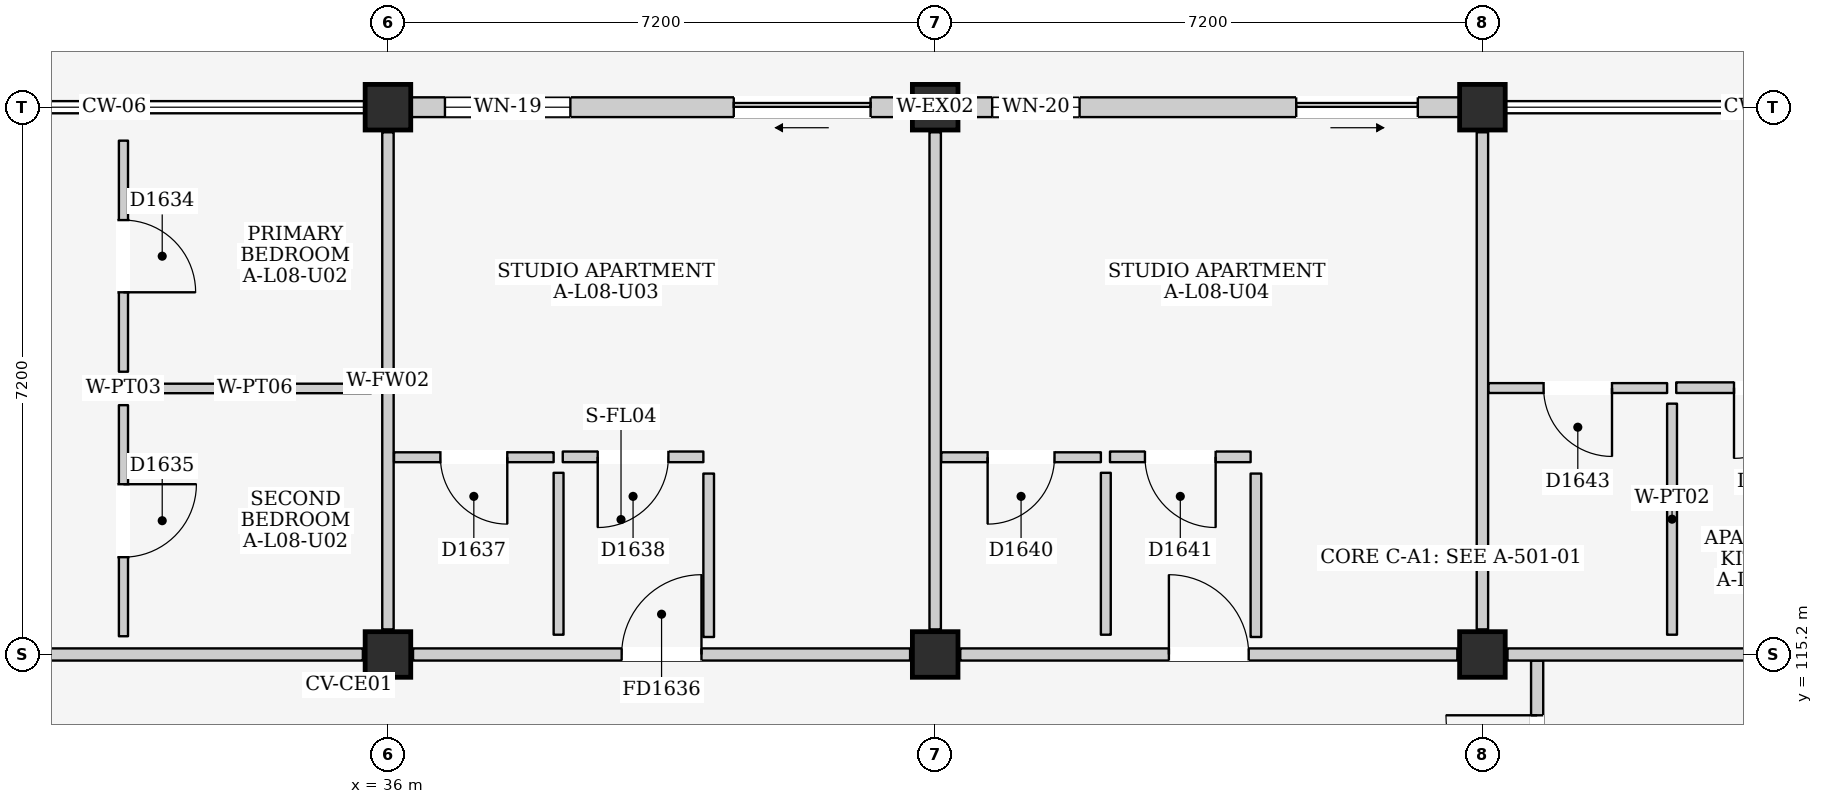
"""IFC4 building model, lengths in metres.
Left out: names, types, materials, properties, quantities, classifications, styles, units other than length and angle.
Written with IfcOpenShell. Run it as: python <this file> out.ifc"""

import sys

from ifc_helpers import new_model, si_unit, direction, frame, frame_2d, origin, origin_2d, place, context, subcontext, project, spatial, rectangle, extrude, element, fill, save


model = new_model("IFC4")
c1 = context("Model", 3, precision=1e-05, world=origin(), true_north=direction((0.0, 1.0)))
c2 = subcontext(c1, "Body", "Model", "MODEL_VIEW")
j1 = project(units=[si_unit("LENGTHUNIT", "METRE"), si_unit("PLANEANGLEUNIT", "RADIAN")], contexts=[c1])
p1 = place(None, origin())
s1 = spatial("IfcSite", under=j1, at=p1, CompositionType="ELEMENT")
p2 = place(p1, origin())
s2 = spatial("IfcBuilding", under=s1, at=p2, CompositionType="ELEMENT")
p3 = place(p2, frame((0.0, 0.0, 28.3)))
s3 = spatial("IfcBuildingStorey", under=s2, at=p3, CompositionType="ELEMENT", Elevation=28.3)
for number, where, z_axis, x_axis in (
    (1, (36.0, 115.2, 0.0), (0.0, 0.0, 1.0), (1.0, 0.0, 0.0)),
    (2, (36.0, 122.4, 0.0), (0.0, 0.0, 1.0), (1.0, 0.0, 0.0)),
    (3, (43.2, 115.2, 0.0), (0.0, 0.0, 1.0), (1.0, 0.0, 0.0)),
    (4, (43.2, 122.4, 0.0), (0.0, 0.0, 1.0), (1.0, 0.0, 0.0)),
    (5, (50.4, 115.2, 0.0), (0.0, 0.0, 1.0), (1.0, 0.0, 0.0)),
    (6, (50.4, 122.4, 0.0), (0.0, 0.0, 1.0), (1.0, 0.0, 0.0)),
):
    element("IfcColumn", number, at=place(p3, frame(where, z_axis=z_axis, x_axis=x_axis)), inside=s3, PredefinedType="COLUMN", context=c2, shape_type="SweptSolid", body=[
        extrude(rectangle(XDim=0.6, YDim=0.6, at=origin_2d()), origin(), (0.0, 0.0, 1.0), 3.2),
    ])
p4 = place(p3, frame((36.3, 122.4, 0.0), z_axis=(0.0, 0.0, 1.0), x_axis=(1.0, 0.0, 0.0)))
e7 = element("IfcWall", 7, at=p4, inside=s3, PredefinedType="ELEMENTEDWALL", context=c2, shape_type="SweptSolid", body=[
    extrude(rectangle(XDim=6.6, YDim=0.26, at=frame_2d((3.3, 0.0))), origin(), (0.0, 0.0, 1.0), 2.485),
])
p5 = place(p4, frame((4.25, 0.0, 0.0)))
e8 = element("IfcOpeningElement", 8, at=p5, cuts=e7, PredefinedType="OPENING", context=c2, shape_type="SweptSolid", body=[
    extrude(rectangle(XDim=1.8, YDim=2.12, at=frame_2d((0.9, 1.06))), frame((0.0, 0.145, 0.0), z_axis=(0.0, -1.0, 0.0), x_axis=(1.0, 0.0, 0.0)), (0.0, 0.0, 1.0), 0.29),
])
p6 = place(p4, frame((0.45, 0.0, 0.9)))
e9 = element("IfcOpeningElement", 9, at=p6, cuts=e7, PredefinedType="OPENING", context=c2, shape_type="SweptSolid", body=[
    extrude(rectangle(XDim=1.65, YDim=1.35, at=frame_2d((0.825, 0.675))), frame((0.0, 0.145, 0.0), z_axis=(0.0, -1.0, 0.0), x_axis=(1.0, 0.0, 0.0)), (0.0, 0.0, 1.0), 0.29),
])
p7 = place(p3, frame((43.5, 122.4, 0.0), z_axis=(0.0, 0.0, 1.0), x_axis=(1.0, 0.0, 0.0)))
e10 = element("IfcWall", 10, at=p7, inside=s3, PredefinedType="ELEMENTEDWALL", context=c2, shape_type="SweptSolid", body=[
    extrude(rectangle(XDim=6.6, YDim=0.26, at=frame_2d((3.3, 0.0))), origin(), (0.0, 0.0, 1.0), 2.485),
])
p8 = place(p7, frame((4.45, 0.0, 0.0)))
e11 = element("IfcOpeningElement", 11, at=p8, cuts=e10, PredefinedType="OPENING", context=c2, shape_type="SweptSolid", body=[
    extrude(rectangle(XDim=1.6, YDim=2.12, at=frame_2d((0.8, 1.06))), frame((0.0, 0.145, 0.0), z_axis=(0.0, -1.0, 0.0), x_axis=(1.0, 0.0, 0.0)), (0.0, 0.0, 1.0), 0.29),
])
p9 = place(p7, frame((0.45, 0.0, 0.9)))
e12 = element("IfcOpeningElement", 12, at=p9, cuts=e10, PredefinedType="OPENING", context=c2, shape_type="SweptSolid", body=[
    extrude(rectangle(XDim=1.15, YDim=1.15, at=frame_2d((0.575, 0.575))), frame((0.0, 0.145, 0.0), z_axis=(0.0, -1.0, 0.0), x_axis=(1.0, 0.0, 0.0)), (0.0, 0.0, 1.0), 0.29),
])
p10 = place(p3, frame((51.12, 111.1, 0.0), z_axis=(0.0, 0.0, 1.0), x_axis=(0.0, 1.0, 0.0)))
e13 = element("IfcWall", 13, at=p10, inside=s3, PredefinedType="PARTITIONING", context=c2, shape_type="SweptSolid", body=[
    extrude(rectangle(XDim=4.02, YDim=0.16, at=frame_2d((2.01, 0.0))), origin(), (0.0, 0.0, 1.0), 2.95),
])
p11 = place(p10, frame((2.1, 0.0, 0.0)))
e14 = element("IfcOpeningElement", 14, at=p11, cuts=e13, PredefinedType="OPENING", context=c2, shape_type="SweptSolid", body=[
    extrude(rectangle(XDim=1.2, YDim=2.2, at=frame_2d((0.6, 1.1))), frame((0.0, 0.095, 0.0), z_axis=(0.0, -1.0, 0.0), x_axis=(1.0, 0.0, 0.0)), (0.0, 0.0, 1.0), 0.19),
])
p12 = place(p3, frame((29.13, 115.2, 0.0), z_axis=(0.0, 0.0, 1.0), x_axis=(1.0, 0.0, 0.0)))
e15 = element("IfcWall", 15, at=p12, inside=s3, PredefinedType="PARTITIONING", context=c2, shape_type="SweptSolid", body=[
    extrude(rectangle(XDim=6.54, YDim=0.16, at=frame_2d((3.27, 0.0))), origin(), (0.0, 0.0, 1.0), 2.285),
])
p13 = place(p3, frame((36.0, 115.53, 0.0), z_axis=(0.0, 0.0, 1.0), x_axis=(0.0, 1.0, 0.0)))
e16 = element("IfcWall", 16, at=p13, inside=s3, PredefinedType="PARTITIONING", context=c2, shape_type="SweptSolid", body=[
    extrude(rectangle(XDim=6.54, YDim=0.15, at=frame_2d((3.27, 0.0))), origin(), (0.0, 0.0, 1.0), 2.435),
])
p14 = place(p3, frame((32.52, 118.92, 0.0), z_axis=(0.0, 0.0, 1.0), x_axis=(0.0, 1.0, 0.0)))
e17 = element("IfcWall", 17, at=p14, inside=s3, PredefinedType="PARTITIONING", context=c2, shape_type="SweptSolid", body=[
    extrude(rectangle(XDim=3.04, YDim=0.12, at=frame_2d((1.52, 0.0))), origin(), (0.0, 0.0, 1.0), 2.95),
])
p15 = place(p14, frame((1.045, 0.0, 0.0)))
e18 = element("IfcOpeningElement", 18, at=p15, cuts=e17, PredefinedType="OPENING", context=c2, shape_type="SweptSolid", body=[
    extrude(rectangle(XDim=0.95, YDim=2.15, at=frame_2d((0.475, 1.075))), frame((0.0, 0.075, 0.0), z_axis=(0.0, -1.0, 0.0), x_axis=(1.0, 0.0, 0.0)), (0.0, 0.0, 1.0), 0.15),
])
p16 = place(p3, frame((32.72, 118.7, 0.0), z_axis=(0.0, 0.0, 1.0), x_axis=(1.0, 0.0, 0.0)))
e19 = element("IfcWall", 19, at=p16, inside=s3, PredefinedType="PARTITIONING", context=c2, shape_type="SweptSolid", body=[
    extrude(rectangle(XDim=3.06, YDim=0.125, at=frame_2d((1.53, 0.0))), origin(), (0.0, 0.0, 1.0), 2.95),
])
p17 = place(p3, frame((32.52, 115.44, 0.0), z_axis=(0.0, 0.0, 1.0), x_axis=(0.0, 1.0, 0.0)))
e20 = element("IfcWall", 20, at=p17, inside=s3, PredefinedType="PARTITIONING", context=c2, shape_type="SweptSolid", body=[
    extrude(rectangle(XDim=3.04, YDim=0.12, at=frame_2d((1.52, 0.0))), origin(), (0.0, 0.0, 1.0), 2.95),
])
p18 = place(p17, frame((1.04, 0.0, 0.0)))
e21 = element("IfcOpeningElement", 21, at=p18, cuts=e20, PredefinedType="OPENING", context=c2, shape_type="SweptSolid", body=[
    extrude(rectangle(XDim=0.96, YDim=2.15, at=frame_2d((0.48, 1.075))), frame((0.0, 0.075, 0.0), z_axis=(0.0, -1.0, 0.0), x_axis=(1.0, 0.0, 0.0)), (0.0, 0.0, 1.0), 0.15),
])
p19 = place(p3, frame((36.33, 115.2, 0.0), z_axis=(0.0, 0.0, 1.0), x_axis=(1.0, 0.0, 0.0)))
e22 = element("IfcWall", 22, at=p19, inside=s3, PredefinedType="PARTITIONING", context=c2, shape_type="SweptSolid", body=[
    extrude(rectangle(XDim=6.54, YDim=0.16, at=frame_2d((3.27, 0.0))), origin(), (0.0, 0.0, 1.0), 2.285),
])
p20 = place(p19, frame((2.745, 0.0, 0.0)))
e23 = element("IfcOpeningElement", 23, at=p20, cuts=e22, PredefinedType="OPENING", context=c2, shape_type="SweptSolid", body=[
    extrude(rectangle(XDim=1.05, YDim=2.15, at=frame_2d((0.525, 1.075))), frame((0.0, 0.095, 0.0), z_axis=(0.0, -1.0, 0.0), x_axis=(1.0, 0.0, 0.0)), (0.0, 0.0, 1.0), 0.19),
])
p21 = place(p3, frame((43.2, 115.53, 0.0), z_axis=(0.0, 0.0, 1.0), x_axis=(0.0, 1.0, 0.0)))
e24 = element("IfcWall", 24, at=p21, inside=s3, PredefinedType="PARTITIONING", context=c2, shape_type="SweptSolid", body=[
    extrude(rectangle(XDim=6.54, YDim=0.15, at=frame_2d((3.27, 0.0))), origin(), (0.0, 0.0, 1.0), 2.435),
])
p22 = place(p3, frame((36.08, 117.795, 0.0), z_axis=(0.0, 0.0, 1.0), x_axis=(1.0, 0.0, 0.0)))
e25 = element("IfcWall", 25, at=p22, inside=s3, PredefinedType="PARTITIONING", context=c2, shape_type="SweptSolid", body=[
    extrude(rectangle(XDim=2.1, YDim=0.13, at=frame_2d((1.05, 0.0))), origin(), (0.0, 0.0, 1.0), 2.95),
])
p23 = place(p22, frame((0.61, 0.0, 0.0)))
e26 = element("IfcOpeningElement", 26, at=p23, cuts=e25, PredefinedType="OPENING", context=c2, shape_type="SweptSolid", body=[
    extrude(rectangle(XDim=0.88, YDim=2.1, at=frame_2d((0.44, 1.05))), frame((0.0, 0.08, 0.0), z_axis=(0.0, -1.0, 0.0), x_axis=(1.0, 0.0, 0.0)), (0.0, 0.0, 1.0), 0.16),
])
p24 = place(p3, frame((38.245, 115.46, 0.0), z_axis=(0.0, 0.0, 1.0), x_axis=(0.0, 1.0, 0.0)))
e27 = element("IfcWall", 27, at=p24, inside=s3, PredefinedType="PARTITIONING", context=c2, shape_type="SweptSolid", body=[
    extrude(rectangle(XDim=2.13, YDim=0.13, at=frame_2d((1.065, 0.0))), origin(), (0.0, 0.0, 1.0), 2.95),
])
p25 = place(p3, frame((38.3, 117.8, 0.0), z_axis=(0.0, 0.0, 1.0), x_axis=(1.0, 0.0, 0.0)))
e28 = element("IfcWall", 28, at=p25, inside=s3, PredefinedType="PARTITIONING", context=c2, shape_type="SweptSolid", body=[
    extrude(rectangle(XDim=1.85, YDim=0.14, at=frame_2d((0.925, 0.0))), origin(), (0.0, 0.0, 1.0), 2.95),
])
p26 = place(p25, frame((0.46, 0.0, 0.0)))
e29 = element("IfcOpeningElement", 29, at=p26, cuts=e28, PredefinedType="OPENING", context=c2, shape_type="SweptSolid", body=[
    extrude(rectangle(XDim=0.93, YDim=2.14, at=frame_2d((0.465, 1.07))), frame((0.0, 0.085, 0.0), z_axis=(0.0, -1.0, 0.0), x_axis=(1.0, 0.0, 0.0)), (0.0, 0.0, 1.0), 0.17),
])
p27 = place(p3, frame((40.22, 115.43, 0.0), z_axis=(0.0, 0.0, 1.0), x_axis=(0.0, 1.0, 0.0)))
e30 = element("IfcWall", 30, at=p27, inside=s3, PredefinedType="PARTITIONING", context=c2, shape_type="SweptSolid", body=[
    extrude(rectangle(XDim=2.15, YDim=0.14, at=frame_2d((1.075, 0.0))), origin(), (0.0, 0.0, 1.0), 2.95),
])
p28 = place(p3, frame((43.53, 115.2, 0.0), z_axis=(0.0, 0.0, 1.0), x_axis=(1.0, 0.0, 0.0)))
e31 = element("IfcWall", 31, at=p28, inside=s3, PredefinedType="PARTITIONING", context=c2, shape_type="SweptSolid", body=[
    extrude(rectangle(XDim=6.54, YDim=0.16, at=frame_2d((3.27, 0.0))), origin(), (0.0, 0.0, 1.0), 2.285),
])
p29 = place(p28, frame((2.745, 0.0, 0.0)))
e32 = element("IfcOpeningElement", 32, at=p29, cuts=e31, PredefinedType="OPENING", context=c2, shape_type="SweptSolid", body=[
    extrude(rectangle(XDim=1.05, YDim=2.15, at=frame_2d((0.525, 1.075))), frame((0.0, 0.095, 0.0), z_axis=(0.0, -1.0, 0.0), x_axis=(1.0, 0.0, 0.0)), (0.0, 0.0, 1.0), 0.19),
])
p30 = place(p3, frame((50.4, 115.53, 0.0), z_axis=(0.0, 0.0, 1.0), x_axis=(0.0, 1.0, 0.0)))
e33 = element("IfcWall", 33, at=p30, inside=s3, PredefinedType="PARTITIONING", context=c2, shape_type="SweptSolid", body=[
    extrude(rectangle(XDim=6.54, YDim=0.15, at=frame_2d((3.27, 0.0))), origin(), (0.0, 0.0, 1.0), 2.435),
])
p31 = place(p3, frame((43.28, 117.795, 0.0), z_axis=(0.0, 0.0, 1.0), x_axis=(1.0, 0.0, 0.0)))
e34 = element("IfcWall", 34, at=p31, inside=s3, PredefinedType="PARTITIONING", context=c2, shape_type="SweptSolid", body=[
    extrude(rectangle(XDim=2.1, YDim=0.13, at=frame_2d((1.05, 0.0))), origin(), (0.0, 0.0, 1.0), 2.95),
])
p32 = place(p31, frame((0.61, 0.0, 0.0)))
e35 = element("IfcOpeningElement", 35, at=p32, cuts=e34, PredefinedType="OPENING", context=c2, shape_type="SweptSolid", body=[
    extrude(rectangle(XDim=0.88, YDim=2.1, at=frame_2d((0.44, 1.05))), frame((0.0, 0.08, 0.0), z_axis=(0.0, -1.0, 0.0), x_axis=(1.0, 0.0, 0.0)), (0.0, 0.0, 1.0), 0.16),
])
p33 = place(p3, frame((45.445, 115.46, 0.0), z_axis=(0.0, 0.0, 1.0), x_axis=(0.0, 1.0, 0.0)))
e36 = element("IfcWall", 36, at=p33, inside=s3, PredefinedType="PARTITIONING", context=c2, shape_type="SweptSolid", body=[
    extrude(rectangle(XDim=2.13, YDim=0.13, at=frame_2d((1.065, 0.0))), origin(), (0.0, 0.0, 1.0), 2.95),
])
p34 = place(p3, frame((45.5, 117.8, 0.0), z_axis=(0.0, 0.0, 1.0), x_axis=(1.0, 0.0, 0.0)))
e37 = element("IfcWall", 37, at=p34, inside=s3, PredefinedType="PARTITIONING", context=c2, shape_type="SweptSolid", body=[
    extrude(rectangle(XDim=1.85, YDim=0.14, at=frame_2d((0.925, 0.0))), origin(), (0.0, 0.0, 1.0), 2.95),
])
p35 = place(p34, frame((0.46, 0.0, 0.0)))
e38 = element("IfcOpeningElement", 38, at=p35, cuts=e37, PredefinedType="OPENING", context=c2, shape_type="SweptSolid", body=[
    extrude(rectangle(XDim=0.93, YDim=2.14, at=frame_2d((0.465, 1.07))), frame((0.0, 0.085, 0.0), z_axis=(0.0, -1.0, 0.0), x_axis=(1.0, 0.0, 0.0)), (0.0, 0.0, 1.0), 0.17),
])
p36 = place(p3, frame((47.42, 115.43, 0.0), z_axis=(0.0, 0.0, 1.0), x_axis=(0.0, 1.0, 0.0)))
e39 = element("IfcWall", 39, at=p36, inside=s3, PredefinedType="PARTITIONING", context=c2, shape_type="SweptSolid", body=[
    extrude(rectangle(XDim=2.15, YDim=0.14, at=frame_2d((1.075, 0.0))), origin(), (0.0, 0.0, 1.0), 2.95),
])
p37 = place(p3, frame((50.73, 115.2, 0.0), z_axis=(0.0, 0.0, 1.0), x_axis=(1.0, 0.0, 0.0)))
e40 = element("IfcWall", 40, at=p37, inside=s3, PredefinedType="PARTITIONING", context=c2, shape_type="SweptSolid", body=[
    extrude(rectangle(XDim=6.54, YDim=0.16, at=frame_2d((3.27, 0.0))), origin(), (0.0, 0.0, 1.0), 2.285),
])
p38 = place(p3, frame((50.48, 118.705, 0.0), z_axis=(0.0, 0.0, 1.0), x_axis=(1.0, 0.0, 0.0)))
e41 = element("IfcWall", 41, at=p38, inside=s3, PredefinedType="PARTITIONING", context=c2, shape_type="SweptSolid", body=[
    extrude(rectangle(XDim=2.35, YDim=0.13, at=frame_2d((1.175, 0.0))), origin(), (0.0, 0.0, 1.0), 2.95),
])
p39 = place(p38, frame((0.725, 0.0, 0.0)))
e42 = element("IfcOpeningElement", 42, at=p39, cuts=e41, PredefinedType="OPENING", context=c2, shape_type="SweptSolid", body=[
    extrude(rectangle(XDim=0.9, YDim=2.1, at=frame_2d((0.45, 1.05))), frame((0.0, 0.08, 0.0), z_axis=(0.0, -1.0, 0.0), x_axis=(1.0, 0.0, 0.0)), (0.0, 0.0, 1.0), 0.16),
])
p40 = place(p3, frame((52.895, 115.46, 0.0), z_axis=(0.0, 0.0, 1.0), x_axis=(0.0, 1.0, 0.0)))
e43 = element("IfcWall", 43, at=p40, inside=s3, PredefinedType="PARTITIONING", context=c2, shape_type="SweptSolid", body=[
    extrude(rectangle(XDim=3.04, YDim=0.13, at=frame_2d((1.52, 0.0))), origin(), (0.0, 0.0, 1.0), 2.95),
])
p41 = place(p3, frame((52.95, 118.71, 0.0), z_axis=(0.0, 0.0, 1.0), x_axis=(1.0, 0.0, 0.0)))
e44 = element("IfcWall", 44, at=p41, inside=s3, PredefinedType="PARTITIONING", context=c2, shape_type="SweptSolid", body=[
    extrude(rectangle(XDim=2.45, YDim=0.14, at=frame_2d((1.225, 0.0))), origin(), (0.0, 0.0, 1.0), 2.95),
])
p42 = place(p41, frame((0.76, 0.0, 0.0)))
e45 = element("IfcOpeningElement", 45, at=p42, cuts=e44, PredefinedType="OPENING", context=c2, shape_type="SweptSolid", body=[
    extrude(rectangle(XDim=0.93, YDim=2.14, at=frame_2d((0.465, 1.07))), frame((0.0, 0.085, 0.0), z_axis=(0.0, -1.0, 0.0), x_axis=(1.0, 0.0, 0.0)), (0.0, 0.0, 1.0), 0.17),
])
p43 = place(p5, frame((1.8, 0.0, 0.0), z_axis=(0.0, 0.0, 1.0), x_axis=(-1.0, 0.0, 0.0)))
e46 = element("IfcDoor", 46, at=p43, inside=s3, OperationType="SLIDING_TO_LEFT", PredefinedType="DOOR", context=c2, shape_type="SweptSolid", body=[
    extrude(rectangle(XDim=1.8, YDim=2.12, at=frame_2d((0.9, 1.06))), frame((0.0, 0.025, 0.0), z_axis=(0.0, -1.0, 0.0), x_axis=(1.0, 0.0, 0.0)), (0.0, 0.0, 1.0), 0.05),
])
fill(e8, e46)
p44 = place(p6, origin())
e47 = element("IfcWindow", 47, at=p44, inside=s3, PartitioningType="DOUBLE_PANEL_VERTICAL", PredefinedType="WINDOW", context=c2, shape_type="SweptSolid", body=[
    extrude(rectangle(XDim=1.65, YDim=1.35, at=frame_2d((0.825, 0.675))), frame((0.0, 0.03, 0.0), z_axis=(0.0, -1.0, 0.0), x_axis=(1.0, 0.0, 0.0)), (0.0, 0.0, 1.0), 0.06),
])
fill(e9, e47)
p45 = place(p8, frame((1.6, 0.0, 0.0), z_axis=(0.0, 0.0, 1.0), x_axis=(-1.0, 0.0, 0.0)))
e48 = element("IfcDoor", 48, at=p45, inside=s3, OperationType="SLIDING_TO_RIGHT", PredefinedType="DOOR", context=c2, shape_type="SweptSolid", body=[
    extrude(rectangle(XDim=1.6, YDim=2.12, at=frame_2d((0.8, 1.06))), frame((0.0, 0.025, 0.0), z_axis=(0.0, -1.0, 0.0), x_axis=(1.0, 0.0, 0.0)), (0.0, 0.0, 1.0), 0.05),
])
fill(e11, e48)
p46 = place(p9, origin())
e49 = element("IfcWindow", 49, at=p46, inside=s3, PartitioningType="SINGLE_PANEL", PredefinedType="WINDOW", context=c2, shape_type="SweptSolid", body=[
    extrude(rectangle(XDim=1.15, YDim=1.15, at=frame_2d((0.575, 0.575))), frame((0.0, 0.03, 0.0), z_axis=(0.0, -1.0, 0.0), x_axis=(1.0, 0.0, 0.0)), (0.0, 0.0, 1.0), 0.06),
])
fill(e12, e49)
p47 = place(p11, origin())
e50 = element("IfcDoor", 50, at=p47, inside=s3, OperationType="SINGLE_SWING_RIGHT", PredefinedType="DOOR", context=c2, shape_type="SweptSolid", body=[
    extrude(rectangle(XDim=1.2, YDim=2.2, at=frame_2d((0.6, 1.1))), frame((0.0, 0.025, 0.0), z_axis=(0.0, -1.0, 0.0), x_axis=(1.0, 0.0, 0.0)), (0.0, 0.0, 1.0), 0.05),
])
fill(e14, e50)
p48 = place(p15, frame((0.95, 0.0, 0.0), z_axis=(0.0, 0.0, 1.0), x_axis=(-1.0, 0.0, 0.0)))
e51 = element("IfcDoor", 51, at=p48, inside=s3, OperationType="SINGLE_SWING_RIGHT", PredefinedType="DOOR", context=c2, shape_type="SweptSolid", body=[
    extrude(rectangle(XDim=0.95, YDim=2.15, at=frame_2d((0.475, 1.075))), frame((0.0, 0.025, 0.0), z_axis=(0.0, -1.0, 0.0), x_axis=(1.0, 0.0, 0.0)), (0.0, 0.0, 1.0), 0.05),
])
fill(e18, e51)
p49 = place(p18, frame((0.96, 0.0, 0.0), z_axis=(0.0, 0.0, 1.0), x_axis=(-1.0, 0.0, 0.0)))
e52 = element("IfcDoor", 52, at=p49, inside=s3, OperationType="SINGLE_SWING_LEFT", PredefinedType="DOOR", context=c2, shape_type="SweptSolid", body=[
    extrude(rectangle(XDim=0.96, YDim=2.15, at=frame_2d((0.48, 1.075))), frame((0.0, 0.025, 0.0), z_axis=(0.0, -1.0, 0.0), x_axis=(1.0, 0.0, 0.0)), (0.0, 0.0, 1.0), 0.05),
])
fill(e21, e52)
p50 = place(p20, origin())
e53 = element("IfcDoor", 53, at=p50, inside=s3, OperationType="SINGLE_SWING_RIGHT", PredefinedType="DOOR", context=c2, shape_type="SweptSolid", body=[
    extrude(rectangle(XDim=1.05, YDim=2.15, at=frame_2d((0.525, 1.075))), frame((0.0, 0.025, 0.0), z_axis=(0.0, -1.0, 0.0), x_axis=(1.0, 0.0, 0.0)), (0.0, 0.0, 1.0), 0.05),
])
fill(e23, e53)
p51 = place(p23, frame((0.88, 0.0, 0.0), z_axis=(0.0, 0.0, 1.0), x_axis=(-1.0, 0.0, 0.0)))
e54 = element("IfcDoor", 54, at=p51, inside=s3, OperationType="SINGLE_SWING_LEFT", PredefinedType="DOOR", context=c2, shape_type="SweptSolid", body=[
    extrude(rectangle(XDim=0.88, YDim=2.1, at=frame_2d((0.44, 1.05))), frame((0.0, 0.025, 0.0), z_axis=(0.0, -1.0, 0.0), x_axis=(1.0, 0.0, 0.0)), (0.0, 0.0, 1.0), 0.05),
])
fill(e26, e54)
p52 = place(p26, frame((0.93, 0.0, 0.0), z_axis=(0.0, 0.0, 1.0), x_axis=(-1.0, 0.0, 0.0)))
e55 = element("IfcDoor", 55, at=p52, inside=s3, OperationType="SINGLE_SWING_RIGHT", PredefinedType="DOOR", context=c2, shape_type="SweptSolid", body=[
    extrude(rectangle(XDim=0.93, YDim=2.14, at=frame_2d((0.465, 1.07))), frame((0.0, 0.025, 0.0), z_axis=(0.0, -1.0, 0.0), x_axis=(1.0, 0.0, 0.0)), (0.0, 0.0, 1.0), 0.05),
])
fill(e29, e55)
p53 = place(p29, origin())
e56 = element("IfcDoor", 56, at=p53, inside=s3, OperationType="SINGLE_SWING_LEFT", PredefinedType="DOOR", context=c2, shape_type="SweptSolid", body=[
    extrude(rectangle(XDim=1.05, YDim=2.15, at=frame_2d((0.525, 1.075))), frame((0.0, 0.025, 0.0), z_axis=(0.0, -1.0, 0.0), x_axis=(1.0, 0.0, 0.0)), (0.0, 0.0, 1.0), 0.05),
])
fill(e32, e56)
p54 = place(p32, frame((0.88, 0.0, 0.0), z_axis=(0.0, 0.0, 1.0), x_axis=(-1.0, 0.0, 0.0)))
e57 = element("IfcDoor", 57, at=p54, inside=s3, OperationType="SINGLE_SWING_RIGHT", PredefinedType="DOOR", context=c2, shape_type="SweptSolid", body=[
    extrude(rectangle(XDim=0.88, YDim=2.1, at=frame_2d((0.44, 1.05))), frame((0.0, 0.025, 0.0), z_axis=(0.0, -1.0, 0.0), x_axis=(1.0, 0.0, 0.0)), (0.0, 0.0, 1.0), 0.05),
])
fill(e35, e57)
p55 = place(p35, frame((0.93, 0.0, 0.0), z_axis=(0.0, 0.0, 1.0), x_axis=(-1.0, 0.0, 0.0)))
e58 = element("IfcDoor", 58, at=p55, inside=s3, OperationType="SINGLE_SWING_LEFT", PredefinedType="DOOR", context=c2, shape_type="SweptSolid", body=[
    extrude(rectangle(XDim=0.93, YDim=2.14, at=frame_2d((0.465, 1.07))), frame((0.0, 0.025, 0.0), z_axis=(0.0, -1.0, 0.0), x_axis=(1.0, 0.0, 0.0)), (0.0, 0.0, 1.0), 0.05),
])
fill(e38, e58)
p56 = place(p39, frame((0.9, 0.0, 0.0), z_axis=(0.0, 0.0, 1.0), x_axis=(-1.0, 0.0, 0.0)))
e59 = element("IfcDoor", 59, at=p56, inside=s3, OperationType="SINGLE_SWING_LEFT", PredefinedType="DOOR", context=c2, shape_type="SweptSolid", body=[
    extrude(rectangle(XDim=0.9, YDim=2.1, at=frame_2d((0.45, 1.05))), frame((0.0, 0.025, 0.0), z_axis=(0.0, -1.0, 0.0), x_axis=(1.0, 0.0, 0.0)), (0.0, 0.0, 1.0), 0.05),
])
fill(e42, e59)
p57 = place(p42, frame((0.93, 0.0, 0.0), z_axis=(0.0, 0.0, 1.0), x_axis=(-1.0, 0.0, 0.0)))
e60 = element("IfcDoor", 60, at=p57, inside=s3, OperationType="SINGLE_SWING_RIGHT", PredefinedType="DOOR", context=c2, shape_type="SweptSolid", body=[
    extrude(rectangle(XDim=0.93, YDim=2.14, at=frame_2d((0.465, 1.07))), frame((0.0, 0.025, 0.0), z_axis=(0.0, -1.0, 0.0), x_axis=(1.0, 0.0, 0.0)), (0.0, 0.0, 1.0), 0.05),
])
fill(e45, e60)
save(model, sys.argv[1])
